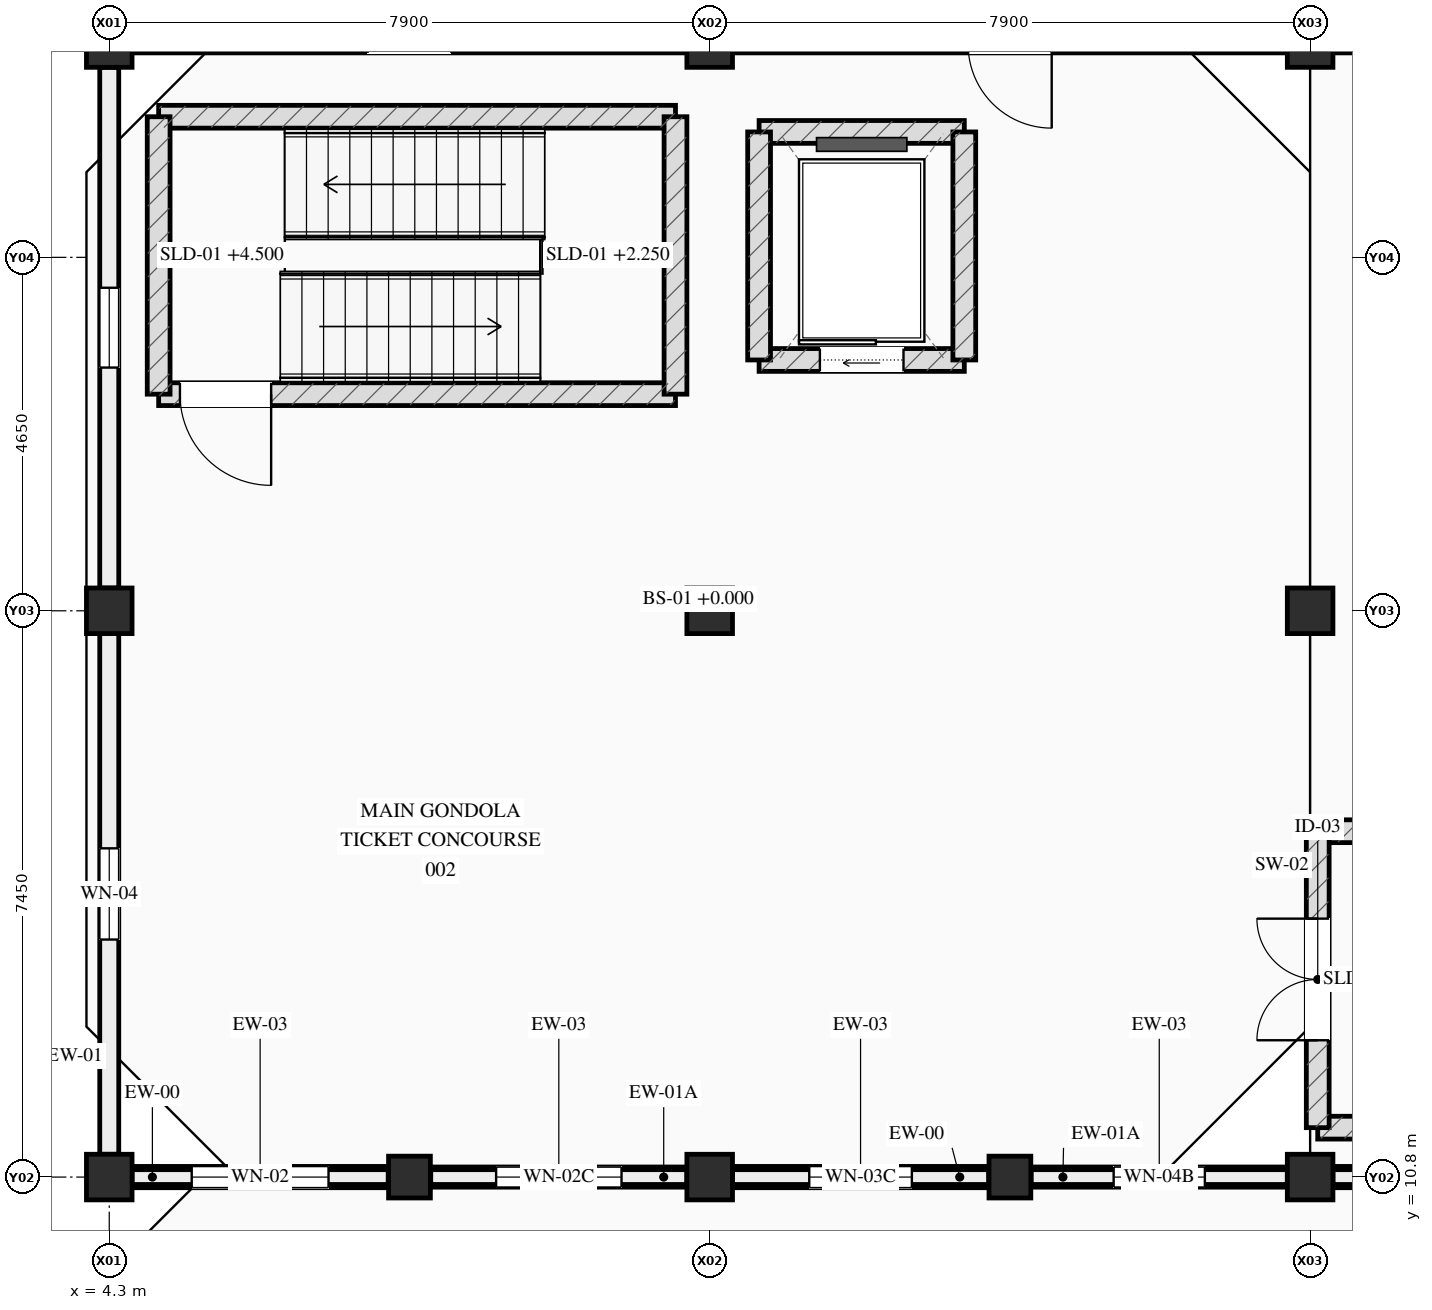
"""IFC4 building model, lengths in metres.
Left out: names, types, materials, properties, quantities, classifications, styles, units other than length and angle.
Written with IfcOpenShell. Run it as: python <this file> out.ifc"""

import sys

from ifc_helpers import new_model, si_unit, direction, frame, frame_2d, origin, origin_2d, place, context, subcontext, project, spatial, rectangle, circle, extrude, element, fill, save


model = new_model("IFC4")
c1 = context("Model", 3, precision=1e-05, world=origin(), true_north=direction((0.0, 1.0)))
c2 = subcontext(c1, "Body", "Model", "MODEL_VIEW")
j1 = project(units=[si_unit("LENGTHUNIT", "METRE"), si_unit("PLANEANGLEUNIT", "RADIAN")], contexts=[c1])
p1 = place(None, origin())
s1 = spatial("IfcSite", under=j1, at=p1, CompositionType="ELEMENT")
p2 = place(p1, origin())
s2 = spatial("IfcBuilding", under=s1, at=p2, CompositionType="ELEMENT")
p3 = place(p2, origin())
s3 = spatial("IfcBuildingStorey", under=s2, at=p3, CompositionType="ELEMENT", Elevation=0.0)
for number, where, z_axis, x_axis in (
    (1, (4.3, 10.8, 0.0), (0.0, 0.0, 1.0), (1.0, 0.0, 0.0)),
    (2, (4.3, 18.25, 0.0), (0.0, 0.0, 1.0), (1.0, 0.0, 0.0)),
    (3, (4.3, 25.7, 0.0), (0.0, 0.0, 1.0), (1.0, 0.0, 0.0)),
    (4, (12.2, 10.8, 0.0), (0.0, 0.0, 1.0), (1.0, 0.0, 0.0)),
    (5, (12.2, 18.25, 0.0), (0.0, 0.0, 1.0), (1.0, 0.0, 0.0)),
    (6, (12.2, 25.7, 0.0), (0.0, 0.0, 1.0), (1.0, 0.0, 0.0)),
    (7, (20.1, 10.8, 0.0), (0.0, 0.0, 1.0), (1.0, 0.0, 0.0)),
    (8, (20.1, 18.25, 0.0), (0.0, 0.0, 1.0), (1.0, 0.0, 0.0)),
    (9, (20.1, 25.7, 0.0), (0.0, 0.0, 1.0), (1.0, 0.0, 0.0)),
):
    element("IfcColumn", number, at=place(p3, frame(where, z_axis=z_axis, x_axis=x_axis)), inside=s3, PredefinedType="COLUMN", context=c2, shape_type="SweptSolid", body=[
        extrude(rectangle(XDim=0.6, YDim=0.6, at=origin_2d()), origin(), (0.0, 0.0, 1.0), 4.5),
    ])
for number, where, z_axis, x_axis in (
    (10, (8.25, 10.8, 0.0), (0.0, 0.0, 1.0), (1.0, 0.0, 0.0)),
    (11, (16.15, 10.8, 0.0), (0.0, 0.0, 1.0), (1.0, 0.0, 0.0)),
):
    element("IfcColumn", number, at=place(p3, frame(where, z_axis=z_axis, x_axis=x_axis)), inside=s3, PredefinedType="PILASTER", context=c2, shape_type="SweptSolid", body=[
        extrude(circle(Radius=0.275, at=origin_2d()), origin(), (0.0, 0.0, 1.0), 4.5),
    ])
p4 = place(p3, frame((7.97, 10.8, 0.0), z_axis=(0.0, 0.0, 1.0), x_axis=(-1.0, 0.0, 0.0)))
e12 = element("IfcWall", 12, at=p4, inside=s3, PredefinedType="STANDARD", context=c2, shape_type="SweptSolid", body=[
    extrude(rectangle(XDim=3.37, YDim=0.28, at=frame_2d((1.685, 0.0))), origin(), (0.0, 0.0, 1.0), 2.985),
])
p5 = place(p4, frame((0.785, 0.0, 0.88)))
e13 = element("IfcOpeningElement", 13, at=p5, cuts=e12, PredefinedType="OPENING", context=c2, shape_type="SweptSolid", body=[
    extrude(rectangle(XDim=1.8, YDim=1.45, at=frame_2d((0.9, 0.725))), frame((0.0, 0.15, 0.0), z_axis=(0.0, -1.0, 0.0), x_axis=(1.0, 0.0, 0.0)), (0.0, 0.0, 1.0), 0.3),
])
p6 = place(p3, frame((7.97, 10.8, 3.35), z_axis=(0.0, 0.0, 1.0), x_axis=(-1.0, 0.0, 0.0)))
e14 = element("IfcWall", 14, at=p6, inside=s3, PredefinedType="STANDARD", context=c2, shape_type="SweptSolid", body=[
    extrude(rectangle(XDim=3.37, YDim=0.195, at=frame_2d((1.685, 0.0))), origin(), (0.0, 0.0, 1.0), 0.23),
])
p7 = place(p3, frame((11.9, 10.8, 0.0), z_axis=(0.0, 0.0, 1.0), x_axis=(-1.0, 0.0, 0.0)))
e15 = element("IfcWall", 15, at=p7, inside=s3, PredefinedType="STANDARD", context=c2, shape_type="SweptSolid", body=[
    extrude(rectangle(XDim=3.37, YDim=0.265, at=frame_2d((1.685, 0.0))), origin(), (0.0, 0.0, 1.0), 2.985),
])
p8 = place(p7, frame((0.86, 0.0, 0.95)))
e16 = element("IfcOpeningElement", 16, at=p8, cuts=e15, PredefinedType="OPENING", context=c2, shape_type="SweptSolid", body=[
    extrude(rectangle(XDim=1.65, YDim=1.45, at=frame_2d((0.825, 0.725))), frame((0.0, 0.142, 0.0), z_axis=(0.0, -1.0, 0.0), x_axis=(1.0, 0.0, 0.0)), (0.0, 0.0, 1.0), 0.285),
])
p9 = place(p3, frame((11.9, 10.8, 3.35), z_axis=(0.0, 0.0, 1.0), x_axis=(-1.0, 0.0, 0.0)))
e17 = element("IfcWall", 17, at=p9, inside=s3, PredefinedType="STANDARD", context=c2, shape_type="SweptSolid", body=[
    extrude(rectangle(XDim=3.37, YDim=0.195, at=frame_2d((1.685, 0.0))), origin(), (0.0, 0.0, 1.0), 0.23),
])
p10 = place(p3, frame((4.6, 25.7, 0.0), z_axis=(0.0, 0.0, 1.0), x_axis=(1.0, 0.0, 0.0)))
e18 = element("IfcWall", 18, at=p10, inside=s3, PredefinedType="STANDARD", context=c2, shape_type="SweptSolid", body=[
    extrude(rectangle(XDim=7.3, YDim=0.22, at=frame_2d((3.65, 0.0))), origin(), (0.0, 0.0, 1.0), 3.58),
])
p11 = place(p10, frame((3.1, 0.0, 0.0)))
e19 = element("IfcOpeningElement", 19, at=p11, cuts=e18, PredefinedType="OPENING", context=c2, shape_type="SweptSolid", body=[
    extrude(rectangle(XDim=1.1, YDim=2.2, at=frame_2d((0.55, 1.1))), frame((0.0, 0.12, 0.0), z_axis=(0.0, -1.0, 0.0), x_axis=(1.0, 0.0, 0.0)), (0.0, 0.0, 1.0), 0.24),
])
p12 = place(p3, frame((15.87, 10.8, 0.0), z_axis=(0.0, 0.0, 1.0), x_axis=(-1.0, 0.0, 0.0)))
e20 = element("IfcWall", 20, at=p12, inside=s3, PredefinedType="STANDARD", context=c2, shape_type="SweptSolid", body=[
    extrude(rectangle(XDim=3.37, YDim=0.28, at=frame_2d((1.685, 0.0))), origin(), (0.0, 0.0, 1.0), 2.985),
])
p13 = place(p12, frame((1.01, 0.0, 0.98)))
e21 = element("IfcOpeningElement", 21, at=p13, cuts=e20, PredefinedType="OPENING", context=c2, shape_type="SweptSolid", body=[
    extrude(rectangle(XDim=1.35, YDim=1.35, at=frame_2d((0.675, 0.675))), frame((0.0, 0.15, 0.0), z_axis=(0.0, -1.0, 0.0), x_axis=(1.0, 0.0, 0.0)), (0.0, 0.0, 1.0), 0.3),
])
p14 = place(p3, frame((15.87, 10.8, 3.35), z_axis=(0.0, 0.0, 1.0), x_axis=(-1.0, 0.0, 0.0)))
e22 = element("IfcWall", 22, at=p14, inside=s3, PredefinedType="STANDARD", context=c2, shape_type="SweptSolid", body=[
    extrude(rectangle(XDim=3.37, YDim=0.195, at=frame_2d((1.685, 0.0))), origin(), (0.0, 0.0, 1.0), 0.23),
])
p15 = place(p3, frame((19.8, 10.8, 0.0), z_axis=(0.0, 0.0, 1.0), x_axis=(-1.0, 0.0, 0.0)))
e23 = element("IfcWall", 23, at=p15, inside=s3, PredefinedType="STANDARD", context=c2, shape_type="SweptSolid", body=[
    extrude(rectangle(XDim=3.37, YDim=0.265, at=frame_2d((1.685, 0.0))), origin(), (0.0, 0.0, 1.0), 2.985),
])
p16 = place(p15, frame((1.085, 0.0, 1.05)))
e24 = element("IfcOpeningElement", 24, at=p16, cuts=e23, PredefinedType="OPENING", context=c2, shape_type="SweptSolid", body=[
    extrude(rectangle(XDim=1.2, YDim=1.15, at=frame_2d((0.6, 0.575))), frame((0.0, 0.142, 0.0), z_axis=(0.0, -1.0, 0.0), x_axis=(1.0, 0.0, 0.0)), (0.0, 0.0, 1.0), 0.285),
])
p17 = place(p3, frame((19.8, 10.8, 3.35), z_axis=(0.0, 0.0, 1.0), x_axis=(-1.0, 0.0, 0.0)))
e25 = element("IfcWall", 25, at=p17, inside=s3, PredefinedType="STANDARD", context=c2, shape_type="SweptSolid", body=[
    extrude(rectangle(XDim=3.37, YDim=0.195, at=frame_2d((1.685, 0.0))), origin(), (0.0, 0.0, 1.0), 0.23),
])
p18 = place(p3, frame((12.5, 25.7, 0.0), z_axis=(0.0, 0.0, 1.0), x_axis=(1.0, 0.0, 0.0)))
e26 = element("IfcWall", 26, at=p18, inside=s3, PredefinedType="STANDARD", context=c2, shape_type="SweptSolid", body=[
    extrude(rectangle(XDim=7.3, YDim=0.22, at=frame_2d((3.65, 0.0))), origin(), (0.0, 0.0, 1.0), 3.58),
])
p19 = place(p18, frame((3.1, 0.0, 0.0)))
e27 = element("IfcOpeningElement", 27, at=p19, cuts=e26, PredefinedType="OPENING", context=c2, shape_type="SweptSolid", body=[
    extrude(rectangle(XDim=1.1, YDim=2.2, at=frame_2d((0.55, 1.1))), frame((0.0, 0.12, 0.0), z_axis=(0.0, -1.0, 0.0), x_axis=(1.0, 0.0, 0.0)), (0.0, 0.0, 1.0), 0.24),
])
p20 = place(p3, frame((23.77, 10.8, 0.0), z_axis=(0.0, 0.0, 1.0), x_axis=(-1.0, 0.0, 0.0)))
e28 = element("IfcWall", 28, at=p20, inside=s3, PredefinedType="STANDARD", context=c2, shape_type="SweptSolid", body=[
    extrude(rectangle(XDim=3.37, YDim=0.28, at=frame_2d((1.685, 0.0))), origin(), (0.0, 0.0, 1.0), 2.985),
])
p21 = place(p3, frame((23.77, 10.8, 3.35), z_axis=(0.0, 0.0, 1.0), x_axis=(-1.0, 0.0, 0.0)))
e29 = element("IfcWall", 29, at=p21, inside=s3, PredefinedType="STANDARD", context=c2, shape_type="SweptSolid", body=[
    extrude(rectangle(XDim=3.37, YDim=0.195, at=frame_2d((1.685, 0.0))), origin(), (0.0, 0.0, 1.0), 0.23),
])
p22 = place(p3, frame((20.4, 25.7, 0.0), z_axis=(0.0, 0.0, 1.0), x_axis=(1.0, 0.0, 0.0)))
e30 = element("IfcWall", 30, at=p22, inside=s3, PredefinedType="STANDARD", context=c2, shape_type="SweptSolid", body=[
    extrude(rectangle(XDim=7.3, YDim=0.22, at=frame_2d((3.65, 0.0))), origin(), (0.0, 0.0, 1.0), 3.58),
])
p23 = place(p22, frame((2.95, 0.0, 1.05)))
e31 = element("IfcOpeningElement", 31, at=p23, cuts=e30, PredefinedType="OPENING", context=c2, shape_type="SweptSolid", body=[
    extrude(rectangle(XDim=1.4, YDim=1.1, at=frame_2d((0.7, 0.55))), frame((0.0, 0.12, 0.0), z_axis=(0.0, -1.0, 0.0), x_axis=(1.0, 0.0, 0.0)), (0.0, 0.0, 1.0), 0.24),
])
p24 = place(p3, frame((4.3, 11.1, 0.0), z_axis=(0.0, 0.0, 1.0), x_axis=(0.0, 1.0, 0.0)))
e32 = element("IfcWall", 32, at=p24, inside=s3, PredefinedType="STANDARD", context=c2, shape_type="SweptSolid", body=[
    extrude(rectangle(XDim=6.85, YDim=0.25, at=frame_2d((3.425, 0.0))), origin(), (0.0, 0.0, 1.0), 3.58),
])
p25 = place(p24, frame((2.825, 0.0, 1.0)))
e33 = element("IfcOpeningElement", 33, at=p25, cuts=e32, PredefinedType="OPENING", context=c2, shape_type="SweptSolid", body=[
    extrude(rectangle(XDim=1.2, YDim=1.35, at=frame_2d((0.6, 0.675))), frame((0.0, 0.135, 0.0), z_axis=(0.0, -1.0, 0.0), x_axis=(1.0, 0.0, 0.0)), (0.0, 0.0, 1.0), 0.27),
])
p26 = place(p3, frame((4.3, 18.55, 0.0), z_axis=(0.0, 0.0, 1.0), x_axis=(0.0, 1.0, 0.0)))
e34 = element("IfcWall", 34, at=p26, inside=s3, PredefinedType="STANDARD", context=c2, shape_type="SweptSolid", body=[
    extrude(rectangle(XDim=6.85, YDim=0.25, at=frame_2d((3.425, 0.0))), origin(), (0.0, 0.0, 1.0), 3.58),
])
p27 = place(p26, frame((2.9, 0.0, 1.02)))
e35 = element("IfcOpeningElement", 35, at=p27, cuts=e34, PredefinedType="OPENING", context=c2, shape_type="SweptSolid", body=[
    extrude(rectangle(XDim=1.05, YDim=1.2, at=frame_2d((0.525, 0.6))), frame((0.0, 0.135, 0.0), z_axis=(0.0, -1.0, 0.0), x_axis=(1.0, 0.0, 0.0)), (0.0, 0.0, 1.0), 0.27),
])
p28 = place(p3, frame((11.75, 21.1, 0.0), z_axis=(0.0, 0.0, 1.0), x_axis=(-1.0, 0.0, 0.0)))
e36 = element("IfcWall", 36, at=p28, inside=s3, PredefinedType="SHEAR", context=c2, shape_type="SweptSolid", body=[
    extrude(rectangle(XDim=6.8, YDim=0.3, at=frame_2d((3.4, 0.0))), origin(), (0.0, 0.0, 1.0), 4.26),
])
p29 = place(p28, frame((5.32, 0.0, 0.0)))
e37 = element("IfcOpeningElement", 37, at=p29, cuts=e36, PredefinedType="OPENING", context=c2, shape_type="SweptSolid", body=[
    extrude(rectangle(XDim=1.2, YDim=2.2, at=frame_2d((0.6, 1.1))), frame((0.0, 0.16, 0.0), z_axis=(0.0, -1.0, 0.0), x_axis=(1.0, 0.0, 0.0)), (0.0, 0.0, 1.0), 0.32),
])
p30 = place(p3, frame((4.95, 24.75, 0.0), z_axis=(0.0, 0.0, 1.0), x_axis=(1.0, 0.0, 0.0)))
e38 = element("IfcWall", 38, at=p30, inside=s3, PredefinedType="SHEAR", context=c2, shape_type="SweptSolid", body=[
    extrude(rectangle(XDim=6.8, YDim=0.3, at=frame_2d((3.4, 0.0))), origin(), (0.0, 0.0, 1.0), 4.26),
])
for number, where, z_axis, x_axis in (
    (39, (4.95, 21.1, 0.0), (0.0, 0.0, 1.0), (0.0, 1.0, 0.0)),
    (40, (11.75, 24.75, 0.0), (0.0, 0.0, 1.0), (0.0, -1.0, 0.0)),
):
    element("IfcWall", number, at=place(p3, frame(where, z_axis=z_axis, x_axis=x_axis)), inside=s3, PredefinedType="SHEAR", context=c2, shape_type="SweptSolid", body=[
        extrude(rectangle(XDim=3.65, YDim=0.3, at=frame_2d((1.825, 0.0))), origin(), (0.0, 0.0, 1.0), 4.26),
    ])
p31 = place(p3, frame((12.85, 21.55, 0.0), z_axis=(0.0, 0.0, 1.0), x_axis=(1.0, 0.0, 0.0)))
e41 = element("IfcWall", 41, at=p31, inside=s3, PredefinedType="SHEAR", context=c2, shape_type="SweptSolid", body=[
    extrude(rectangle(XDim=2.7, YDim=0.3, at=frame_2d((1.35, 0.0))), origin(), (0.0, 0.0, 1.0), 4.26),
])
p32 = place(p31, frame((0.8, 0.0, 0.0)))
e42 = element("IfcOpeningElement", 42, at=p32, cuts=e41, PredefinedType="OPENING", context=c2, shape_type="SweptSolid", body=[
    extrude(rectangle(XDim=1.1, YDim=2.2, at=frame_2d((0.55, 1.1))), frame((0.0, 0.16, 0.0), z_axis=(0.0, -1.0, 0.0), x_axis=(1.0, 0.0, 0.0)), (0.0, 0.0, 1.0), 0.32),
])
p33 = place(p3, frame((12.85, 24.55, 0.0), z_axis=(0.0, 0.0, 1.0), x_axis=(1.0, 0.0, 0.0)))
e43 = element("IfcWall", 43, at=p33, inside=s3, PredefinedType="SHEAR", context=c2, shape_type="SweptSolid", body=[
    extrude(rectangle(XDim=2.7, YDim=0.3, at=frame_2d((1.35, 0.0))), origin(), (0.0, 0.0, 1.0), 4.26),
])
for number, where, z_axis, x_axis in (
    (44, (12.85, 21.55, 0.0), (0.0, 0.0, 1.0), (0.0, 1.0, 0.0)),
    (45, (15.55, 21.55, 0.0), (0.0, 0.0, 1.0), (0.0, 1.0, 0.0)),
):
    element("IfcWall", number, at=place(p3, frame(where, z_axis=z_axis, x_axis=x_axis)), inside=s3, PredefinedType="SHEAR", context=c2, shape_type="SweptSolid", body=[
        extrude(rectangle(XDim=3.0, YDim=0.3, at=frame_2d((1.5, 0.0))), origin(), (0.0, 0.0, 1.0), 4.26),
    ])
for number, where, z_axis, x_axis in (
    (46, (20.2, 11.45, 0.0), (0.0, 0.0, 1.0), (1.0, 0.0, 0.0)),
    (47, (20.2, 15.35, 0.0), (0.0, 0.0, 1.0), (1.0, 0.0, 0.0)),
):
    element("IfcWall", number, at=place(p3, frame(where, z_axis=z_axis, x_axis=x_axis)), inside=s3, PredefinedType="SHEAR", context=c2, shape_type="SweptSolid", body=[
        extrude(rectangle(XDim=7.65, YDim=0.3, at=frame_2d((3.825, 0.0))), origin(), (0.0, 0.0, 1.0), 4.26),
    ])
p34 = place(p3, frame((20.2, 11.45, 0.0), z_axis=(0.0, 0.0, 1.0), x_axis=(0.0, 1.0, 0.0)))
e48 = element("IfcWall", 48, at=p34, inside=s3, PredefinedType="SHEAR", context=c2, shape_type="SweptSolid", body=[
    extrude(rectangle(XDim=3.9, YDim=0.3, at=frame_2d((1.95, 0.0))), origin(), (0.0, 0.0, 1.0), 4.26),
])
p35 = place(p34, frame((1.15, 0.0, 0.0)))
e49 = element("IfcOpeningElement", 49, at=p35, cuts=e48, PredefinedType="OPENING", context=c2, shape_type="SweptSolid", body=[
    extrude(rectangle(XDim=1.6, YDim=2.2, at=frame_2d((0.8, 1.1))), frame((0.0, 0.16, 0.0), z_axis=(0.0, -1.0, 0.0), x_axis=(1.0, 0.0, 0.0)), (0.0, 0.0, 1.0), 0.32),
])
p36 = place(p5, origin())
e50 = element("IfcWindow", 50, at=p36, inside=s3, PartitioningType="SINGLE_PANEL", PredefinedType="WINDOW", context=c2, shape_type="SweptSolid", body=[
    extrude(rectangle(XDim=1.8, YDim=1.45, at=frame_2d((0.9, 0.725))), frame((0.0, 0.03, 0.0), z_axis=(0.0, -1.0, 0.0), x_axis=(1.0, 0.0, 0.0)), (0.0, 0.0, 1.0), 0.06),
])
fill(e13, e50)
p37 = place(p8, origin())
e51 = element("IfcWindow", 51, at=p37, inside=s3, PartitioningType="SINGLE_PANEL", PredefinedType="WINDOW", context=c2, shape_type="SweptSolid", body=[
    extrude(rectangle(XDim=1.65, YDim=1.45, at=frame_2d((0.825, 0.725))), frame((0.0, 0.03, 0.0), z_axis=(0.0, -1.0, 0.0), x_axis=(1.0, 0.0, 0.0)), (0.0, 0.0, 1.0), 0.06),
])
fill(e16, e51)
p38 = place(p13, origin())
e52 = element("IfcWindow", 52, at=p38, inside=s3, PartitioningType="SINGLE_PANEL", PredefinedType="WINDOW", context=c2, shape_type="SweptSolid", body=[
    extrude(rectangle(XDim=1.35, YDim=1.35, at=frame_2d((0.675, 0.675))), frame((0.0, 0.03, 0.0), z_axis=(0.0, -1.0, 0.0), x_axis=(1.0, 0.0, 0.0)), (0.0, 0.0, 1.0), 0.06),
])
fill(e21, e52)
p39 = place(p16, origin())
e53 = element("IfcWindow", 53, at=p39, inside=s3, PartitioningType="SINGLE_PANEL", PredefinedType="WINDOW", context=c2, shape_type="SweptSolid", body=[
    extrude(rectangle(XDim=1.2, YDim=1.15, at=frame_2d((0.6, 0.575))), frame((0.0, 0.03, 0.0), z_axis=(0.0, -1.0, 0.0), x_axis=(1.0, 0.0, 0.0)), (0.0, 0.0, 1.0), 0.06),
])
fill(e24, e53)
p40 = place(p25, origin())
e54 = element("IfcWindow", 54, at=p40, inside=s3, PartitioningType="SINGLE_PANEL", PredefinedType="WINDOW", context=c2, shape_type="SweptSolid", body=[
    extrude(rectangle(XDim=1.2, YDim=1.35, at=frame_2d((0.6, 0.675))), frame((0.0, 0.03, 0.0), z_axis=(0.0, -1.0, 0.0), x_axis=(1.0, 0.0, 0.0)), (0.0, 0.0, 1.0), 0.06),
])
fill(e33, e54)
p41 = place(p27, origin())
e55 = element("IfcWindow", 55, at=p41, inside=s3, PartitioningType="SINGLE_PANEL", PredefinedType="WINDOW", context=c2, shape_type="SweptSolid", body=[
    extrude(rectangle(XDim=1.05, YDim=1.2, at=frame_2d((0.525, 0.6))), frame((0.0, 0.03, 0.0), z_axis=(0.0, -1.0, 0.0), x_axis=(1.0, 0.0, 0.0)), (0.0, 0.0, 1.0), 0.06),
])
fill(e35, e55)
p42 = place(p29, origin())
e56 = element("IfcDoor", 56, at=p42, inside=s3, OperationType="SINGLE_SWING_LEFT", PredefinedType="DOOR", context=c2, shape_type="SweptSolid", body=[
    extrude(rectangle(XDim=1.2, YDim=2.2, at=frame_2d((0.6, 1.1))), frame((0.0, 0.025, 0.0), z_axis=(0.0, -1.0, 0.0), x_axis=(1.0, 0.0, 0.0)), (0.0, 0.0, 1.0), 0.05),
])
fill(e37, e56)
p43 = place(p32, origin())
e57 = element("IfcDoor", 57, at=p43, inside=s3, OperationType="SLIDING_TO_LEFT", PredefinedType="DOOR", context=c2, shape_type="SweptSolid", body=[
    extrude(rectangle(XDim=1.1, YDim=2.2, at=frame_2d((0.55, 1.1))), frame((0.0, 0.025, 0.0), z_axis=(0.0, -1.0, 0.0), x_axis=(1.0, 0.0, 0.0)), (0.0, 0.0, 1.0), 0.05),
])
fill(e42, e57)
p44 = place(p35, origin())
e58 = element("IfcDoor", 58, at=p44, inside=s3, OperationType="DOUBLE_DOOR_SINGLE_SWING", PredefinedType="DOOR", context=c2, shape_type="SweptSolid", body=[
    extrude(rectangle(XDim=1.6, YDim=2.2, at=frame_2d((0.8, 1.1))), frame((0.0, 0.025, 0.0), z_axis=(0.0, -1.0, 0.0), x_axis=(1.0, 0.0, 0.0)), (0.0, 0.0, 1.0), 0.05),
])
fill(e49, e58)
save(model, sys.argv[1])
